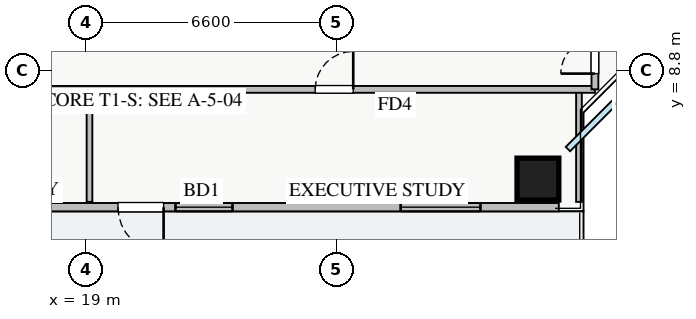
"""IFC4 building model, lengths in metres.
Left out: names, types, materials, properties, quantities, classifications, styles, units other than length and angle.
Written with IfcOpenShell. Run it as: python <this file> out.ifc"""

import sys

from ifc_helpers import new_model, si_unit, direction, frame, frame_2d, origin, origin_2d, place, context, subcontext, project, spatial, rectangle, extrude, source, transform, mapped, element, fill, save


model = new_model("IFC4")
c1 = context("Model", 3, precision=1e-05, world=origin(), true_north=direction((0.0, 1.0)))
c2 = subcontext(c1, "Body", "Model", "MODEL_VIEW")
j1 = project(units=[si_unit("LENGTHUNIT", "METRE"), si_unit("PLANEANGLEUNIT", "RADIAN")], contexts=[c1])
p1 = place(None, origin())
s1 = spatial("IfcSite", under=j1, at=p1, CompositionType="ELEMENT")
p2 = place(p1, origin())
s2 = spatial("IfcBuilding", under=s1, at=p2, CompositionType="ELEMENT")
p3 = place(p2, frame((0.0, 0.0, 97.0)))
s3 = spatial("IfcBuildingStorey", under=s2, at=p3, CompositionType="ELEMENT", Elevation=97.0)
m1 = source(origin(), c2, "Body", "SweptSolid", [
    extrude(rectangle(XDim=1.1, YDim=1.1, at=origin_2d()), origin(), (0.0, 0.0, 1.0), 3.25),
])
p4 = place(p3, frame((30.9, 5.95, 0.0), z_axis=(0.0, 0.0, 1.0), x_axis=(1.0, 0.0, 0.0)))
e1 = element("IfcColumn", 1, at=p4, inside=s3, PredefinedType="COLUMN", context=c2, shape_type="MappedRepresentation", body=[
    mapped(m1, transform((0.0, 0.0, 0.0), x_axis=(1.0, 0.0, 0.0), y_axis=(0.0, 1.0, 0.0), z_axis=(0.0, 0.0, 1.0), scale=1.0)),
])
p5 = place(p3, frame((6.55, 5.21, 0.0), z_axis=(0.0, 0.0, 1.0), x_axis=(1.0, 0.0, 0.0)))
e2 = element("IfcWall", 2, at=p5, inside=s3, PredefinedType="STANDARD", context=c2, shape_type="SweptSolid", body=[
    extrude(rectangle(XDim=24.9, YDim=0.22, at=frame_2d((12.45, 0.0))), origin(), (0.0, 0.0, 1.0), 2.61),
])
p6 = place(p5, frame((13.3, 0.0, 0.0)))
e3 = element("IfcOpeningElement", 3, at=p6, cuts=e2, PredefinedType="OPENING", context=c2, shape_type="SweptSolid", body=[
    extrude(rectangle(XDim=1.2, YDim=2.1, at=frame_2d((0.6, 1.05))), frame((0.0, 0.12, 0.0), z_axis=(0.0, -1.0, 0.0), x_axis=(1.0, 0.0, 0.0)), (0.0, 0.0, 1.0), 0.24),
])
p7 = place(p5, frame((0.393, 0.0, 0.9)))
e4 = element("IfcOpeningElement", 4, at=p7, cuts=e2, PredefinedType="OPENING", context=c2, shape_type="SweptSolid", body=[
    extrude(rectangle(XDim=1.5, YDim=1.5, at=frame_2d((0.75, 0.75))), frame((0.0, 0.12, 0.0), z_axis=(0.0, -1.0, 0.0), x_axis=(1.0, 0.0, 0.0)), (0.0, 0.0, 1.0), 0.24),
])
p8 = place(p5, frame((8.438, 0.0, 0.9)))
e5 = element("IfcOpeningElement", 5, at=p8, cuts=e2, PredefinedType="OPENING", context=c2, shape_type="SweptSolid", body=[
    extrude(rectangle(XDim=1.8, YDim=1.45, at=frame_2d((0.9, 0.725))), frame((0.0, 0.12, 0.0), z_axis=(0.0, -1.0, 0.0), x_axis=(1.0, 0.0, 0.0)), (0.0, 0.0, 1.0), 0.24),
])
p9 = place(p5, frame((14.813, 0.0, 0.9)))
e6 = element("IfcOpeningElement", 6, at=p9, cuts=e2, PredefinedType="OPENING", context=c2, shape_type="SweptSolid", body=[
    extrude(rectangle(XDim=1.5, YDim=1.45, at=frame_2d((0.75, 0.725))), frame((0.0, 0.12, 0.0), z_axis=(0.0, -1.0, 0.0), x_axis=(1.0, 0.0, 0.0)), (0.0, 0.0, 1.0), 0.24),
])
p10 = place(p5, frame((20.738, 0.0, 0.9)))
e7 = element("IfcOpeningElement", 7, at=p10, cuts=e2, PredefinedType="OPENING", context=c2, shape_type="SweptSolid", body=[
    extrude(rectangle(XDim=2.1, YDim=1.48, at=frame_2d((1.05, 0.74))), frame((0.0, 0.12, 0.0), z_axis=(0.0, -1.0, 0.0), x_axis=(1.0, 0.0, 0.0)), (0.0, 0.0, 1.0), 0.24),
])
p11 = place(p5, frame((4.171, 0.0, 0.9)))
e8 = element("IfcOpeningElement", 8, at=p11, cuts=e2, PredefinedType="OPENING", context=c2, shape_type="SweptSolid", body=[
    extrude(rectangle(XDim=2.4, YDim=1.5, at=frame_2d((1.2, 0.75))), frame((0.0, 0.12, 0.0), z_axis=(0.0, -1.0, 0.0), x_axis=(1.0, 0.0, 0.0)), (0.0, 0.0, 1.0), 0.24),
])
p12 = place(p3, frame((19.1, 5.35, 0.0), z_axis=(0.0, 0.0, 1.0), x_axis=(0.0, 1.0, 0.0)))
e9 = element("IfcWall", 9, at=p12, inside=s3, PredefinedType="PARTITIONING", context=c2, shape_type="SweptSolid", body=[
    extrude(rectangle(XDim=2.96, YDim=0.15, at=frame_2d((1.48, 0.0))), origin(), (0.0, 0.0, 1.0), 2.815),
])
p13 = place(p3, frame((31.98, 5.35, 0.0), z_axis=(0.0, 0.0, 1.0), x_axis=(0.0, 1.0, 0.0)))
e10 = element("IfcWall", 10, at=p13, inside=s3, PredefinedType="PARTITIONING", context=c2, shape_type="SweptSolid", body=[
    extrude(rectangle(XDim=2.96, YDim=0.15, at=frame_2d((1.48, 0.0))), origin(), (0.0, 0.0, 1.0), 3.07),
])
p14 = place(p3, frame((8.82, 8.31, 0.0), z_axis=(0.0, 0.0, 1.0), x_axis=(1.0, 0.0, 0.0)))
e11 = element("IfcWall", 11, at=p14, inside=s3, PredefinedType="PARTITIONING", context=c2, shape_type="SweptSolid", body=[
    extrude(rectangle(XDim=23.58, YDim=0.18, at=frame_2d((11.79, 0.0))), origin(), (0.0, 0.0, 1.0), 3.07),
])
p15 = place(p14, frame((4.64, 0.0, 0.0)))
e12 = element("IfcOpeningElement", 12, at=p15, cuts=e11, PredefinedType="OPENING", context=c2, shape_type="SweptSolid", body=[
    extrude(rectangle(XDim=1.0, YDim=2.05, at=frame_2d((0.5, 1.025))), frame((0.0, 0.1, 0.0), z_axis=(0.0, -1.0, 0.0), x_axis=(1.0, 0.0, 0.0)), (0.0, 0.0, 1.0), 0.2),
])
p16 = place(p14, frame((16.22, 0.0, 0.0)))
e13 = element("IfcOpeningElement", 13, at=p16, cuts=e11, PredefinedType="OPENING", context=c2, shape_type="SweptSolid", body=[
    extrude(rectangle(XDim=1.0, YDim=2.05, at=frame_2d((0.5, 1.025))), frame((0.0, 0.1, 0.0), z_axis=(0.0, -1.0, 0.0), x_axis=(1.0, 0.0, 0.0)), (0.0, 0.0, 1.0), 0.2),
])
p17 = place(p3, frame((32.4, 8.31, 0.0), z_axis=(0.0, 0.0, 1.0), x_axis=(0.0, 1.0, 0.0)))
e14 = element("IfcWall", 14, at=p17, inside=s3, PredefinedType="PARTITIONING", context=c2, shape_type="SweptSolid", body=[
    extrude(rectangle(XDim=29.13, YDim=0.18, at=frame_2d((14.565, 0.0))), origin(), (0.0, 0.0, 1.0), 3.07),
])
p18 = place(p17, frame((27.94, 0.0, 0.0)))
e15 = element("IfcOpeningElement", 15, at=p18, cuts=e14, PredefinedType="OPENING", context=c2, shape_type="SweptSolid", body=[
    extrude(rectangle(XDim=0.9, YDim=2.05, at=frame_2d((0.45, 1.025))), frame((0.0, 0.1, 0.0), z_axis=(0.0, -1.0, 0.0), x_axis=(1.0, 0.0, 0.0)), (0.0, 0.0, 1.0), 0.2),
])
p19 = place(p17, frame((0.415, 0.0, 0.0)))
e16 = element("IfcOpeningElement", 16, at=p19, cuts=e14, PredefinedType="OPENING", context=c2, shape_type="SweptSolid", body=[
    extrude(rectangle(XDim=0.9, YDim=2.05, at=frame_2d((0.45, 1.025))), frame((0.0, 0.1, 0.0), z_axis=(0.0, -1.0, 0.0), x_axis=(1.0, 0.0, 0.0)), (0.0, 0.0, 1.0), 0.2),
])
p20 = place(p17, frame((5.88, 0.0, 0.0)))
e17 = element("IfcOpeningElement", 17, at=p20, cuts=e14, PredefinedType="OPENING", context=c2, shape_type="SweptSolid", body=[
    extrude(rectangle(XDim=1.0, YDim=2.05, at=frame_2d((0.5, 1.025))), frame((0.0, 0.1, 0.0), z_axis=(0.0, -1.0, 0.0), x_axis=(1.0, 0.0, 0.0)), (0.0, 0.0, 1.0), 0.2),
])
p21 = place(p17, frame((12.23, 0.0, 0.0)))
e18 = element("IfcOpeningElement", 18, at=p21, cuts=e14, PredefinedType="OPENING", context=c2, shape_type="SweptSolid", body=[
    extrude(rectangle(XDim=1.0, YDim=2.05, at=frame_2d((0.5, 1.025))), frame((0.0, 0.1, 0.0), z_axis=(0.0, -1.0, 0.0), x_axis=(1.0, 0.0, 0.0)), (0.0, 0.0, 1.0), 0.2),
])
p22 = place(p17, frame((20.835, 0.0, 0.0)))
e19 = element("IfcOpeningElement", 19, at=p22, cuts=e14, PredefinedType="OPENING", context=c2, shape_type="SweptSolid", body=[
    extrude(rectangle(XDim=1.0, YDim=2.05, at=frame_2d((0.5, 1.025))), frame((0.0, 0.1, 0.0), z_axis=(0.0, -1.0, 0.0), x_axis=(1.0, 0.0, 0.0)), (0.0, 0.0, 1.0), 0.2),
])
m2 = source(origin(), c2, "Body", "SweptSolid", [
    extrude(rectangle(XDim=1.2, YDim=2.1, at=frame_2d((0.6, 1.05))), frame((0.0, 0.025, 0.0), z_axis=(0.0, -1.0, 0.0), x_axis=(1.0, 0.0, 0.0)), (0.0, 0.0, 1.0), 0.05),
])
p23 = place(p6, frame((1.2, 0.0, 0.0), z_axis=(0.0, 0.0, 1.0), x_axis=(-1.0, 0.0, 0.0)))
e20 = element("IfcDoor", 20, at=p23, inside=s3, OperationType="SINGLE_SWING_RIGHT", PredefinedType="DOOR", context=c2, shape_type="MappedRepresentation", body=[
    mapped(m2, transform((0.0, 0.0, 0.0), x_axis=(1.0, 0.0, 0.0), y_axis=(0.0, 1.0, 0.0), z_axis=(0.0, 0.0, 1.0), scale=1.0)),
])
fill(e3, e20)
m3 = source(origin(), c2, "Body", "SweptSolid", [
    extrude(rectangle(XDim=1.5, YDim=1.45, at=frame_2d((0.75, 0.725))), frame((0.0, 0.03, 0.0), z_axis=(0.0, -1.0, 0.0), x_axis=(1.0, 0.0, 0.0)), (0.0, 0.0, 1.0), 0.06),
])
p24 = place(p9, origin())
e21 = element("IfcWindow", 21, at=p24, inside=s3, PartitioningType="DOUBLE_PANEL_VERTICAL", PredefinedType="WINDOW", context=c2, shape_type="MappedRepresentation", body=[
    mapped(m3, transform((0.0, 0.0, 0.0), x_axis=(1.0, 0.0, 0.0), y_axis=(0.0, 1.0, 0.0), z_axis=(0.0, 0.0, 1.0), scale=1.0)),
])
fill(e6, e21)
m4 = source(origin(), c2, "Body", "SweptSolid", [
    extrude(rectangle(XDim=2.1, YDim=1.48, at=frame_2d((1.05, 0.74))), frame((0.0, 0.03, 0.0), z_axis=(0.0, -1.0, 0.0), x_axis=(1.0, 0.0, 0.0)), (0.0, 0.0, 1.0), 0.06),
])
p25 = place(p10, origin())
e22 = element("IfcWindow", 22, at=p25, inside=s3, PartitioningType="TRIPLE_PANEL_VERTICAL", PredefinedType="WINDOW", context=c2, shape_type="MappedRepresentation", body=[
    mapped(m4, transform((0.0, 0.0, 0.0), x_axis=(1.0, 0.0, 0.0), y_axis=(0.0, 1.0, 0.0), z_axis=(0.0, 0.0, 1.0), scale=1.0)),
])
fill(e7, e22)
m5 = source(origin(), c2, "Body", "SweptSolid", [
    extrude(rectangle(XDim=1.0, YDim=2.05, at=frame_2d((0.5, 1.025))), frame((0.0, 0.025, 0.0), z_axis=(0.0, -1.0, 0.0), x_axis=(1.0, 0.0, 0.0)), (0.0, 0.0, 1.0), 0.05),
])
p26 = place(p16, origin())
e23 = element("IfcDoor", 23, at=p26, inside=s3, OperationType="SINGLE_SWING_RIGHT", PredefinedType="DOOR", context=c2, shape_type="MappedRepresentation", body=[
    mapped(m5, transform((0.0, 0.0, 0.0), x_axis=(1.0, 0.0, 0.0), y_axis=(0.0, 1.0, 0.0), z_axis=(0.0, 0.0, 1.0), scale=1.0)),
])
fill(e13, e23)
m6 = source(origin(), c2, "Body", "SweptSolid", [
    extrude(rectangle(XDim=0.9, YDim=2.05, at=frame_2d((0.45, 1.025))), frame((0.0, 0.025, 0.0), z_axis=(0.0, -1.0, 0.0), x_axis=(1.0, 0.0, 0.0)), (0.0, 0.0, 1.0), 0.05),
])
p27 = place(p19, origin())
e24 = element("IfcDoor", 24, at=p27, inside=s3, OperationType="SINGLE_SWING_LEFT", PredefinedType="DOOR", context=c2, shape_type="MappedRepresentation", body=[
    mapped(m6, transform((0.0, 0.0, 0.0), x_axis=(1.0, 0.0, 0.0), y_axis=(0.0, 1.0, 0.0), z_axis=(0.0, 0.0, 1.0), scale=1.0)),
])
fill(e16, e24)
save(model, sys.argv[1])
